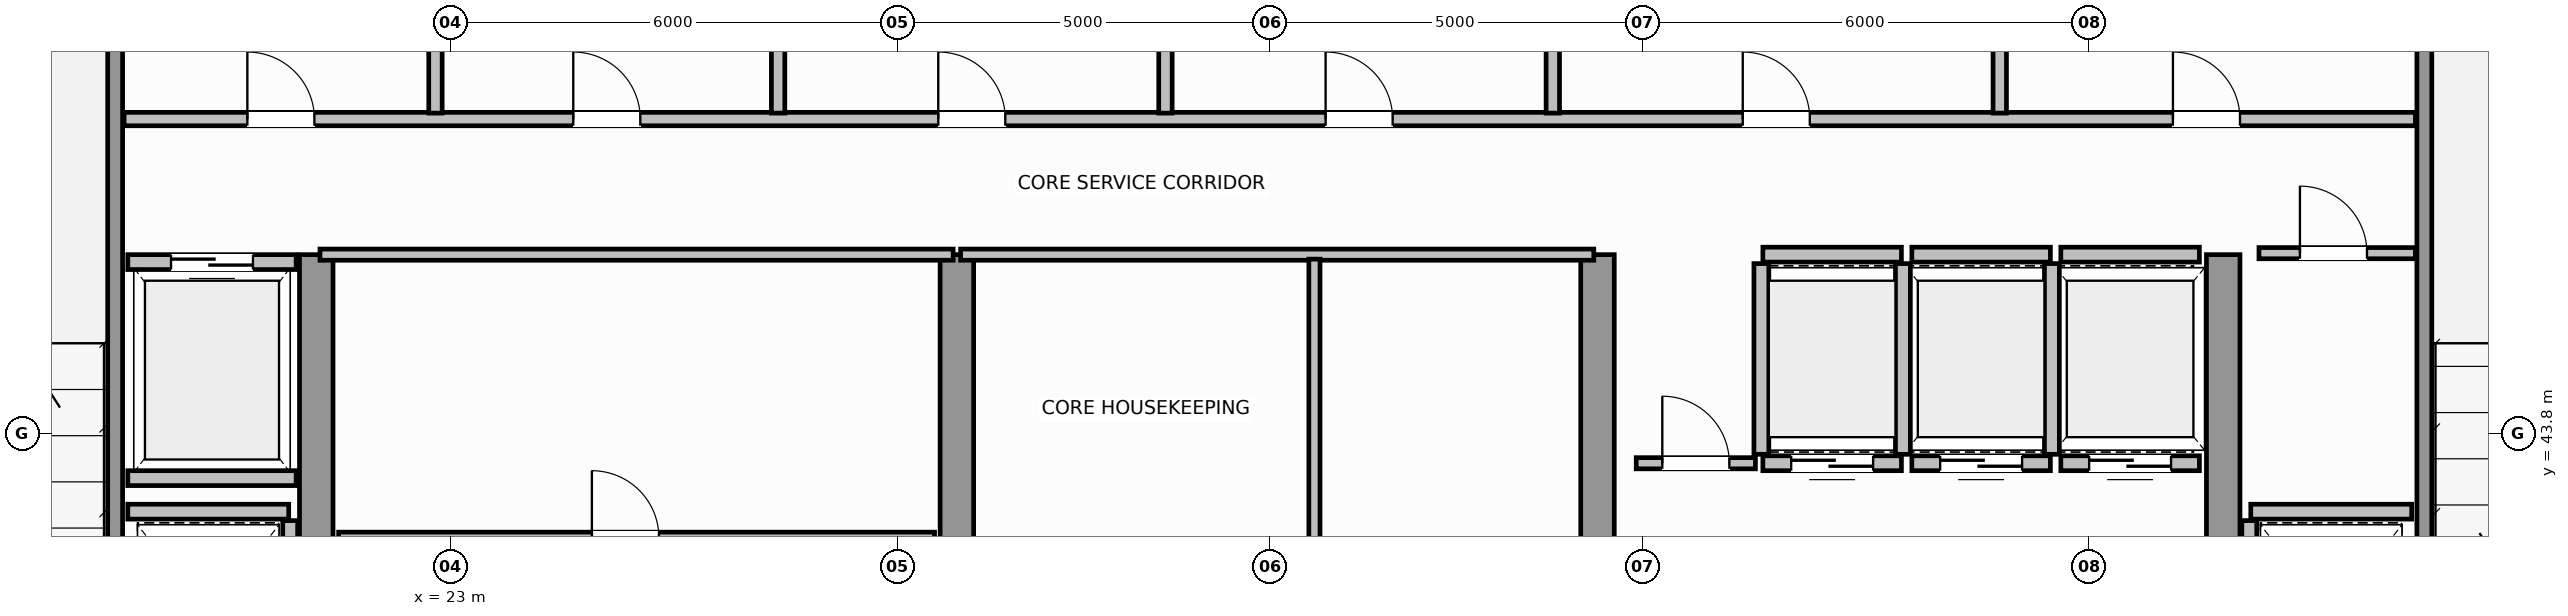
"""IFC4 building model, lengths in metres.
Left out: names, types, materials, properties, quantities, classifications, styles, units other than length and angle.
Written with IfcOpenShell. Run it as: python <this file> out.ifc"""

import sys

from ifc_helpers import new_model, si_unit, direction, frame, frame_2d, origin, place, context, subcontext, project, spatial, rectangle, extrude, source, transform, mapped, element, fill, save


model = new_model("IFC4")
c1 = context("Model", 3, precision=1e-05, world=origin(), true_north=direction((0.0, 1.0)))
c2 = subcontext(c1, "Body", "Model", "MODEL_VIEW")
j1 = project(units=[si_unit("LENGTHUNIT", "METRE"), si_unit("PLANEANGLEUNIT", "RADIAN")], contexts=[c1])
p1 = place(None, origin())
s1 = spatial("IfcSite", under=j1, at=p1, CompositionType="ELEMENT")
p2 = place(p1, origin())
s2 = spatial("IfcBuilding", under=s1, at=p2, CompositionType="ELEMENT")
p3 = place(p2, frame((0.0, 0.0, 265.0)))
s3 = spatial("IfcBuildingStorey", under=s2, at=p3, CompositionType="ELEMENT", Elevation=265.0)
for number, where, z_axis, x_axis in (
    (1, (21.2, 36.745, 0.0), (0.0, 0.0, 1.0), (0.0, 1.0, 0.0)),
    (2, (29.8, 36.745, 0.0), (0.0, 0.0, 1.0), (0.0, 1.0, 0.0)),
    (3, (38.4, 36.745, 0.0), (0.0, 0.0, 1.0), (0.0, 1.0, 0.0)),
    (4, (46.8, 36.745, 0.0), (0.0, 0.0, 1.0), (0.0, 1.0, 0.0)),
):
    element("IfcWall", number, at=place(p3, frame(where, z_axis=z_axis, x_axis=x_axis)), inside=s3, PredefinedType="SHEAR", context=c2, shape_type="SweptSolid", body=[
        extrude(rectangle(XDim=9.455, YDim=0.45, at=frame_2d((4.728, 0.0))), origin(), (0.0, 0.0, 1.0), 3.8),
    ])
for number, where, z_axis, x_axis in (
    (5, (18.5, 39.96, 0.0), (0.0, 0.0, 1.0), (0.0, 1.0, 0.0)),
    (6, (49.5, 39.96, 0.0), (0.0, 0.0, 1.0), (0.0, 1.0, 0.0)),
):
    element("IfcWall", number, at=place(p3, frame(where, z_axis=z_axis, x_axis=x_axis)), inside=s3, PredefinedType="SOLIDWALL", context=c2, shape_type="SweptSolid", body=[
        extrude(rectangle(XDim=9.93, YDim=0.2, at=frame_2d((4.965, 0.0))), origin(), (0.0, 0.0, 1.0), 3.8),
    ])
p4 = place(p3, frame((40.62, 43.4, 0.0), z_axis=(0.0, 0.0, 1.0), x_axis=(1.0, 0.0, 0.0)))
e7 = element("IfcWall", 7, at=p4, inside=s3, PredefinedType="SOLIDWALL", context=c2, shape_type="SweptSolid", body=[
    extrude(rectangle(XDim=1.86, YDim=0.2, at=frame_2d((0.93, 0.0))), origin(), (0.0, 0.0, 1.0), 3.58),
])
p5 = place(p4, frame((0.38, 0.0, 0.0)))
e8 = element("IfcOpeningElement", 8, at=p5, cuts=e7, PredefinedType="OPENING", context=c2, shape_type="SweptSolid", body=[
    extrude(rectangle(XDim=1.1, YDim=2.15, at=frame_2d((0.55, 1.075))), frame((0.0, 0.11, 0.0), z_axis=(0.0, -1.0, 0.0), x_axis=(1.0, 0.0, 0.0)), (0.0, 0.0, 1.0), 0.22),
])
p6 = place(p3, frame((40.62, 46.2, 0.0), z_axis=(0.0, 0.0, 1.0), x_axis=(1.0, 0.0, 0.0)))
e9 = element("IfcWall", 9, at=p6, inside=s3, PredefinedType="SOLIDWALL", context=c2, shape_type="SweptSolid", body=[
    extrude(rectangle(XDim=1.86, YDim=0.2, at=frame_2d((0.93, 0.0))), origin(), (0.0, 0.0, 1.0), 3.58),
])
for number, where, z_axis, x_axis in (
    (10, (40.6, 43.52, 0.0), (0.0, 0.0, 1.0), (0.0, 1.0, 0.0)),
    (11, (42.5, 43.52, 0.0), (0.0, 0.0, 1.0), (0.0, 1.0, 0.0)),
):
    element("IfcWall", number, at=place(p3, frame(where, z_axis=z_axis, x_axis=x_axis)), inside=s3, PredefinedType="SOLIDWALL", context=c2, shape_type="SweptSolid", body=[
        extrude(rectangle(XDim=2.56, YDim=0.2, at=frame_2d((1.28, 0.0))), origin(), (0.0, 0.0, 1.0), 3.58),
    ])
p7 = place(p3, frame((42.62, 43.4, 0.0), z_axis=(0.0, 0.0, 1.0), x_axis=(1.0, 0.0, 0.0)))
e12 = element("IfcWall", 12, at=p7, inside=s3, PredefinedType="SOLIDWALL", context=c2, shape_type="SweptSolid", body=[
    extrude(rectangle(XDim=1.86, YDim=0.2, at=frame_2d((0.93, 0.0))), origin(), (0.0, 0.0, 1.0), 3.58),
])
p8 = place(p7, frame((0.38, 0.0, 0.0)))
e13 = element("IfcOpeningElement", 13, at=p8, cuts=e12, PredefinedType="OPENING", context=c2, shape_type="SweptSolid", body=[
    extrude(rectangle(XDim=1.1, YDim=2.15, at=frame_2d((0.55, 1.075))), frame((0.0, 0.11, 0.0), z_axis=(0.0, -1.0, 0.0), x_axis=(1.0, 0.0, 0.0)), (0.0, 0.0, 1.0), 0.22),
])
p9 = place(p3, frame((42.62, 46.2, 0.0), z_axis=(0.0, 0.0, 1.0), x_axis=(1.0, 0.0, 0.0)))
e14 = element("IfcWall", 14, at=p9, inside=s3, PredefinedType="SOLIDWALL", context=c2, shape_type="SweptSolid", body=[
    extrude(rectangle(XDim=1.86, YDim=0.2, at=frame_2d((0.93, 0.0))), origin(), (0.0, 0.0, 1.0), 3.58),
])
p10 = place(p3, frame((44.5, 43.52, 0.0), z_axis=(0.0, 0.0, 1.0), x_axis=(0.0, 1.0, 0.0)))
e15 = element("IfcWall", 15, at=p10, inside=s3, PredefinedType="SOLIDWALL", context=c2, shape_type="SweptSolid", body=[
    extrude(rectangle(XDim=2.56, YDim=0.2, at=frame_2d((1.28, 0.0))), origin(), (0.0, 0.0, 1.0), 2.37),
])
p11 = place(p3, frame((44.62, 43.4, 0.0), z_axis=(0.0, 0.0, 1.0), x_axis=(1.0, 0.0, 0.0)))
e16 = element("IfcWall", 16, at=p11, inside=s3, PredefinedType="SOLIDWALL", context=c2, shape_type="SweptSolid", body=[
    extrude(rectangle(XDim=1.86, YDim=0.2, at=frame_2d((0.93, 0.0))), origin(), (0.0, 0.0, 1.0), 3.58),
])
p12 = place(p11, frame((0.38, 0.0, 0.0)))
e17 = element("IfcOpeningElement", 17, at=p12, cuts=e16, PredefinedType="OPENING", context=c2, shape_type="SweptSolid", body=[
    extrude(rectangle(XDim=1.1, YDim=2.15, at=frame_2d((0.55, 1.075))), frame((0.0, 0.11, 0.0), z_axis=(0.0, -1.0, 0.0), x_axis=(1.0, 0.0, 0.0)), (0.0, 0.0, 1.0), 0.22),
])
p13 = place(p3, frame((44.62, 46.2, 0.0), z_axis=(0.0, 0.0, 1.0), x_axis=(1.0, 0.0, 0.0)))
e18 = element("IfcWall", 18, at=p13, inside=s3, PredefinedType="SOLIDWALL", context=c2, shape_type="SweptSolid", body=[
    extrude(rectangle(XDim=1.86, YDim=0.2, at=frame_2d((0.93, 0.0))), origin(), (0.0, 0.0, 1.0), 3.58),
])
p14 = place(p3, frame((18.67, 46.1, 0.0), z_axis=(0.0, 0.0, 1.0), x_axis=(1.0, 0.0, 0.0)))
e19 = element("IfcWall", 19, at=p14, inside=s3, PredefinedType="SOLIDWALL", context=c2, shape_type="SweptSolid", body=[
    extrude(rectangle(XDim=2.26, YDim=0.2, at=frame_2d((1.13, 0.0))), origin(), (0.0, 0.0, 1.0), 3.58),
])
p15 = place(p14, frame((0.58, 0.0, 0.0)))
e20 = element("IfcOpeningElement", 20, at=p15, cuts=e19, PredefinedType="OPENING", context=c2, shape_type="SweptSolid", body=[
    extrude(rectangle(XDim=1.1, YDim=2.15, at=frame_2d((0.55, 1.075))), frame((0.0, 0.11, 0.0), z_axis=(0.0, -1.0, 0.0), x_axis=(1.0, 0.0, 0.0)), (0.0, 0.0, 1.0), 0.22),
])
p16 = place(p3, frame((18.67, 43.2, 0.0), z_axis=(0.0, 0.0, 1.0), x_axis=(1.0, 0.0, 0.0)))
e21 = element("IfcWall", 21, at=p16, inside=s3, PredefinedType="SOLIDWALL", context=c2, shape_type="SweptSolid", body=[
    extrude(rectangle(XDim=2.26, YDim=0.2, at=frame_2d((1.13, 0.0))), origin(), (0.0, 0.0, 1.0), 3.58),
])
p17 = place(p3, frame((18.67, 42.75, 0.0), z_axis=(0.0, 0.0, 1.0), x_axis=(1.0, 0.0, 0.0)))
e22 = element("IfcWall", 22, at=p17, inside=s3, PredefinedType="SOLIDWALL", context=c2, shape_type="SweptSolid", body=[
    extrude(rectangle(XDim=2.16, YDim=0.2, at=frame_2d((1.08, 0.0))), origin(), (0.0, 0.0, 1.0), 3.58),
])
p18 = place(p3, frame((20.85, 40.07, 0.0), z_axis=(0.0, 0.0, 1.0), x_axis=(0.0, 1.0, 0.0)))
e23 = element("IfcWall", 23, at=p18, inside=s3, PredefinedType="SOLIDWALL", context=c2, shape_type="SweptSolid", body=[
    extrude(rectangle(XDim=2.56, YDim=0.2, at=frame_2d((1.28, 0.0))), origin(), (0.0, 0.0, 1.0), 3.58),
])
p19 = place(p3, frame((47.17, 42.75, 0.0), z_axis=(0.0, 0.0, 1.0), x_axis=(1.0, 0.0, 0.0)))
e24 = element("IfcWall", 24, at=p19, inside=s3, PredefinedType="SOLIDWALL", context=c2, shape_type="SweptSolid", body=[
    extrude(rectangle(XDim=2.16, YDim=0.2, at=frame_2d((1.08, 0.0))), origin(), (0.0, 0.0, 1.0), 3.58),
])
p20 = place(p3, frame((47.15, 40.07, 0.0), z_axis=(0.0, 0.0, 1.0), x_axis=(0.0, 1.0, 0.0)))
e25 = element("IfcWall", 25, at=p20, inside=s3, PredefinedType="SOLIDWALL", context=c2, shape_type="SweptSolid", body=[
    extrude(rectangle(XDim=2.56, YDim=0.2, at=frame_2d((1.28, 0.0))), origin(), (0.0, 0.0, 1.0), 3.58),
])
p21 = place(p3, frame((21.25, 46.2, 0.0), z_axis=(0.0, 0.0, 1.0), x_axis=(1.0, 0.0, 0.0)))
e26 = element("IfcWall", 26, at=p21, inside=s3, PredefinedType="PARTITIONING", context=c2, shape_type="SweptSolid", body=[
    extrude(rectangle(XDim=8.5, YDim=0.15, at=frame_2d((4.25, 0.0))), origin(), (0.0, 0.0, 1.0), 3.58),
])
p22 = place(p3, frame((21.5, 42.4, 0.0), z_axis=(0.0, 0.0, 1.0), x_axis=(1.0, 0.0, 0.0)))
e27 = element("IfcWall", 27, at=p22, inside=s3, PredefinedType="PARTITIONING", context=c2, shape_type="SweptSolid", body=[
    extrude(rectangle(XDim=8.0, YDim=0.15, at=frame_2d((4.0, 0.0))), origin(), (0.0, 0.0, 1.0), 3.58),
])
p23 = place(p22, frame((3.4, 0.0, 0.0)))
e28 = element("IfcOpeningElement", 28, at=p23, cuts=e27, PredefinedType="OPENING", context=c2, shape_type="SweptSolid", body=[
    extrude(rectangle(XDim=0.9, YDim=2.1, at=frame_2d((0.45, 1.05))), frame((0.0, 0.085, 0.0), z_axis=(0.0, -1.0, 0.0), x_axis=(1.0, 0.0, 0.0)), (0.0, 0.0, 1.0), 0.17),
])
p24 = place(p3, frame((29.85, 46.2, 0.0), z_axis=(0.0, 0.0, 1.0), x_axis=(1.0, 0.0, 0.0)))
e29 = element("IfcWall", 29, at=p24, inside=s3, PredefinedType="PARTITIONING", context=c2, shape_type="SweptSolid", body=[
    extrude(rectangle(XDim=8.5, YDim=0.15, at=frame_2d((4.25, 0.0))), origin(), (0.0, 0.0, 1.0), 3.58),
])
p25 = place(p3, frame((34.6, 36.56, 0.0), z_axis=(0.0, 0.0, 1.0), x_axis=(0.0, 1.0, 0.0)))
e30 = element("IfcWall", 30, at=p25, inside=s3, PredefinedType="PARTITIONING", context=c2, shape_type="SweptSolid", body=[
    extrude(rectangle(XDim=9.58, YDim=0.15, at=frame_2d((4.79, 0.0))), origin(), (0.0, 0.0, 1.0), 3.58),
])
p26 = place(p25, frame((4.2, 0.0, 0.0)))
e31 = element("IfcOpeningElement", 31, at=p26, cuts=e30, PredefinedType="OPENING", context=c2, shape_type="SweptSolid", body=[
    extrude(rectangle(XDim=0.9, YDim=2.1, at=frame_2d((0.45, 1.05))), frame((0.0, 0.085, 0.0), z_axis=(0.0, -1.0, 0.0), x_axis=(1.0, 0.0, 0.0)), (0.0, 0.0, 1.0), 0.17),
])
p27 = place(p3, frame((47.28, 46.22, 0.0), z_axis=(0.0, 0.0, 1.0), x_axis=(1.0, 0.0, 0.0)))
e32 = element("IfcWall", 32, at=p27, inside=s3, PredefinedType="PARTITIONING", context=c2, shape_type="SweptSolid", body=[
    extrude(rectangle(XDim=2.1, YDim=0.15, at=frame_2d((1.05, 0.0))), origin(), (0.0, 0.0, 1.0), 3.58),
])
p28 = place(p27, frame((0.55, 0.0, 0.0)))
e33 = element("IfcOpeningElement", 33, at=p28, cuts=e32, PredefinedType="OPENING", context=c2, shape_type="SweptSolid", body=[
    extrude(rectangle(XDim=0.9, YDim=2.1, at=frame_2d((0.45, 1.05))), frame((0.0, 0.085, 0.0), z_axis=(0.0, -1.0, 0.0), x_axis=(1.0, 0.0, 0.0)), (0.0, 0.0, 1.0), 0.17),
])
p29 = place(p3, frame((38.92, 43.4, 0.0), z_axis=(0.0, 0.0, 1.0), x_axis=(1.0, 0.0, 0.0)))
e34 = element("IfcWall", 34, at=p29, inside=s3, PredefinedType="PARTITIONING", context=c2, shape_type="SweptSolid", body=[
    extrude(rectangle(XDim=1.6, YDim=0.15, at=frame_2d((0.8, 0.0))), origin(), (0.0, 0.0, 1.0), 3.58),
])
p30 = place(p29, frame((0.35, 0.0, 0.0)))
e35 = element("IfcOpeningElement", 35, at=p30, cuts=e34, PredefinedType="OPENING", context=c2, shape_type="SweptSolid", body=[
    extrude(rectangle(XDim=0.9, YDim=2.1, at=frame_2d((0.45, 1.05))), frame((0.0, 0.085, 0.0), z_axis=(0.0, -1.0, 0.0), x_axis=(1.0, 0.0, 0.0)), (0.0, 0.0, 1.0), 0.17),
])
p31 = place(p3, frame((18.62, 48.02, 0.0), z_axis=(0.0, 0.0, 1.0), x_axis=(1.0, 0.0, 0.0)))
e36 = element("IfcWall", 36, at=p31, inside=s3, PredefinedType="PLUMBINGWALL", context=c2, shape_type="SweptSolid", body=[
    extrude(rectangle(XDim=30.76, YDim=0.18, at=frame_2d((15.38, 0.0))), origin(), (0.0, 0.0, 1.0), 3.58),
])
p32 = place(p31, frame((1.655, 0.0, 0.0)))
e37 = element("IfcOpeningElement", 37, at=p32, cuts=e36, PredefinedType="OPENING", context=c2, shape_type="SweptSolid", body=[
    extrude(rectangle(XDim=0.9, YDim=2.15, at=frame_2d((0.45, 1.075))), frame((0.0, 0.1, 0.0), z_axis=(0.0, -1.0, 0.0), x_axis=(1.0, 0.0, 0.0)), (0.0, 0.0, 1.0), 0.2),
])
p33 = place(p31, frame((6.03, 0.0, 0.0)))
e38 = element("IfcOpeningElement", 38, at=p33, cuts=e36, PredefinedType="OPENING", context=c2, shape_type="SweptSolid", body=[
    extrude(rectangle(XDim=0.9, YDim=2.15, at=frame_2d((0.45, 1.075))), frame((0.0, 0.1, 0.0), z_axis=(0.0, -1.0, 0.0), x_axis=(1.0, 0.0, 0.0)), (0.0, 0.0, 1.0), 0.2),
])
p34 = place(p31, frame((10.93, 0.0, 0.0)))
e39 = element("IfcOpeningElement", 39, at=p34, cuts=e36, PredefinedType="OPENING", context=c2, shape_type="SweptSolid", body=[
    extrude(rectangle(XDim=0.9, YDim=2.15, at=frame_2d((0.45, 1.075))), frame((0.0, 0.1, 0.0), z_axis=(0.0, -1.0, 0.0), x_axis=(1.0, 0.0, 0.0)), (0.0, 0.0, 1.0), 0.2),
])
p35 = place(p31, frame((16.13, 0.0, 0.0)))
e40 = element("IfcOpeningElement", 40, at=p35, cuts=e36, PredefinedType="OPENING", context=c2, shape_type="SweptSolid", body=[
    extrude(rectangle(XDim=0.9, YDim=2.15, at=frame_2d((0.45, 1.075))), frame((0.0, 0.1, 0.0), z_axis=(0.0, -1.0, 0.0), x_axis=(1.0, 0.0, 0.0)), (0.0, 0.0, 1.0), 0.2),
])
p36 = place(p31, frame((21.73, 0.0, 0.0)))
e41 = element("IfcOpeningElement", 41, at=p36, cuts=e36, PredefinedType="OPENING", context=c2, shape_type="SweptSolid", body=[
    extrude(rectangle(XDim=0.9, YDim=2.15, at=frame_2d((0.45, 1.075))), frame((0.0, 0.1, 0.0), z_axis=(0.0, -1.0, 0.0), x_axis=(1.0, 0.0, 0.0)), (0.0, 0.0, 1.0), 0.2),
])
p37 = place(p31, frame((27.505, 0.0, 0.0)))
e42 = element("IfcOpeningElement", 42, at=p37, cuts=e36, PredefinedType="OPENING", context=c2, shape_type="SweptSolid", body=[
    extrude(rectangle(XDim=0.9, YDim=2.15, at=frame_2d((0.45, 1.075))), frame((0.0, 0.1, 0.0), z_axis=(0.0, -1.0, 0.0), x_axis=(1.0, 0.0, 0.0)), (0.0, 0.0, 1.0), 0.2),
])
p38 = place(p3, frame((22.8, 48.1, 0.0), z_axis=(0.0, 0.0, 1.0), x_axis=(0.0, 1.0, 0.0)))
e43 = element("IfcWall", 43, at=p38, inside=s3, PredefinedType="PLUMBINGWALL", context=c2, shape_type="SweptSolid", body=[
    extrude(rectangle(XDim=2.43, YDim=0.18, at=frame_2d((1.215, 0.0))), origin(), (0.0, 0.0, 1.0), 2.37),
])
for number, where, z_axis, x_axis in (
    (44, (27.4, 48.1, 0.0), (0.0, 0.0, 1.0), (0.0, 1.0, 0.0)),
    (45, (32.6, 48.1, 0.0), (0.0, 0.0, 1.0), (0.0, 1.0, 0.0)),
    (46, (37.8, 48.1, 0.0), (0.0, 0.0, 1.0), (0.0, 1.0, 0.0)),
    (47, (43.8, 48.1, 0.0), (0.0, 0.0, 1.0), (0.0, 1.0, 0.0)),
):
    element("IfcWall", number, at=place(p3, frame(where, z_axis=z_axis, x_axis=x_axis)), inside=s3, PredefinedType="PLUMBINGWALL", context=c2, shape_type="SweptSolid", body=[
        extrude(rectangle(XDim=2.43, YDim=0.18, at=frame_2d((1.215, 0.0))), origin(), (0.0, 0.0, 1.0), 3.58),
    ])
m1 = source(origin(), c2, "Body", "SweptSolid", [
    extrude(rectangle(XDim=1.1, YDim=2.15, at=frame_2d((0.55, 1.075))), frame((0.0, 0.025, 0.0), z_axis=(0.0, -1.0, 0.0), x_axis=(1.0, 0.0, 0.0)), (0.0, 0.0, 1.0), 0.05),
])
p39 = place(p5, origin())
e48 = element("IfcDoor", 48, at=p39, inside=s3, OperationType="DOUBLE_DOOR_SLIDING", PredefinedType="DOOR", context=c2, shape_type="MappedRepresentation", body=[
    mapped(m1, transform((0.0, 0.0, 0.0), scale=1.0)),
])
fill(e8, e48)
p40 = place(p8, origin())
e49 = element("IfcDoor", 49, at=p40, inside=s3, OperationType="DOUBLE_DOOR_SLIDING", PredefinedType="DOOR", context=c2, shape_type="MappedRepresentation", body=[
    mapped(m1, transform((0.0, 0.0, 0.0), scale=1.0)),
])
fill(e13, e49)
p41 = place(p12, origin())
e50 = element("IfcDoor", 50, at=p41, inside=s3, OperationType="DOUBLE_DOOR_SLIDING", PredefinedType="DOOR", context=c2, shape_type="MappedRepresentation", body=[
    mapped(m1, transform((0.0, 0.0, 0.0), scale=1.0)),
])
fill(e17, e50)
p42 = place(p15, origin())
e51 = element("IfcDoor", 51, at=p42, inside=s3, OperationType="DOUBLE_DOOR_SLIDING", PredefinedType="DOOR", context=c2, shape_type="MappedRepresentation", body=[
    mapped(m1, transform((0.0, 0.0, 0.0), scale=1.0)),
])
fill(e20, e51)
m2 = source(origin(), c2, "Body", "SweptSolid", [
    extrude(rectangle(XDim=0.9, YDim=2.1, at=frame_2d((0.45, 1.05))), frame((0.0, 0.025, 0.0), z_axis=(0.0, -1.0, 0.0), x_axis=(1.0, 0.0, 0.0)), (0.0, 0.0, 1.0), 0.05),
])
p43 = place(p23, origin())
e52 = element("IfcDoor", 52, at=p43, inside=s3, OperationType="SINGLE_SWING_RIGHT", PredefinedType="DOOR", context=c2, shape_type="MappedRepresentation", body=[
    mapped(m2, transform((0.0, 0.0, 0.0), scale=1.0)),
])
fill(e28, e52)
p44 = place(p28, origin())
e53 = element("IfcDoor", 53, at=p44, inside=s3, OperationType="SINGLE_SWING_RIGHT", PredefinedType="DOOR", context=c2, shape_type="MappedRepresentation", body=[
    mapped(m2, transform((0.0, 0.0, 0.0), scale=1.0)),
])
fill(e33, e53)
p45 = place(p30, origin())
e54 = element("IfcDoor", 54, at=p45, inside=s3, OperationType="SINGLE_SWING_LEFT", PredefinedType="DOOR", context=c2, shape_type="MappedRepresentation", body=[
    mapped(m2, transform((0.0, 0.0, 0.0), scale=1.0)),
])
fill(e35, e54)
m3 = source(origin(), c2, "Body", "SweptSolid", [
    extrude(rectangle(XDim=0.9, YDim=2.15, at=frame_2d((0.45, 1.075))), frame((0.0, 0.025, 0.0), z_axis=(0.0, -1.0, 0.0), x_axis=(1.0, 0.0, 0.0)), (0.0, 0.0, 1.0), 0.05),
])
p46 = place(p32, origin())
e55 = element("IfcDoor", 55, at=p46, inside=s3, OperationType="SINGLE_SWING_LEFT", PredefinedType="DOOR", context=c2, shape_type="MappedRepresentation", body=[
    mapped(m3, transform((0.0, 0.0, 0.0), scale=1.0)),
])
fill(e37, e55)
p47 = place(p33, origin())
e56 = element("IfcDoor", 56, at=p47, inside=s3, OperationType="SINGLE_SWING_RIGHT", PredefinedType="DOOR", context=c2, shape_type="MappedRepresentation", body=[
    mapped(m3, transform((0.0, 0.0, 0.0), scale=1.0)),
])
fill(e38, e56)
p48 = place(p34, origin())
e57 = element("IfcDoor", 57, at=p48, inside=s3, OperationType="SINGLE_SWING_LEFT", PredefinedType="DOOR", context=c2, shape_type="MappedRepresentation", body=[
    mapped(m3, transform((0.0, 0.0, 0.0), scale=1.0)),
])
fill(e39, e57)
p49 = place(p35, origin())
e58 = element("IfcDoor", 58, at=p49, inside=s3, OperationType="SINGLE_SWING_RIGHT", PredefinedType="DOOR", context=c2, shape_type="MappedRepresentation", body=[
    mapped(m3, transform((0.0, 0.0, 0.0), scale=1.0)),
])
fill(e40, e58)
p50 = place(p36, origin())
e59 = element("IfcDoor", 59, at=p50, inside=s3, OperationType="SINGLE_SWING_LEFT", PredefinedType="DOOR", context=c2, shape_type="MappedRepresentation", body=[
    mapped(m3, transform((0.0, 0.0, 0.0), scale=1.0)),
])
fill(e41, e59)
p51 = place(p37, origin())
e60 = element("IfcDoor", 60, at=p51, inside=s3, OperationType="SINGLE_SWING_RIGHT", PredefinedType="DOOR", context=c2, shape_type="MappedRepresentation", body=[
    mapped(m3, transform((0.0, 0.0, 0.0), scale=1.0)),
])
fill(e42, e60)
save(model, sys.argv[1])
